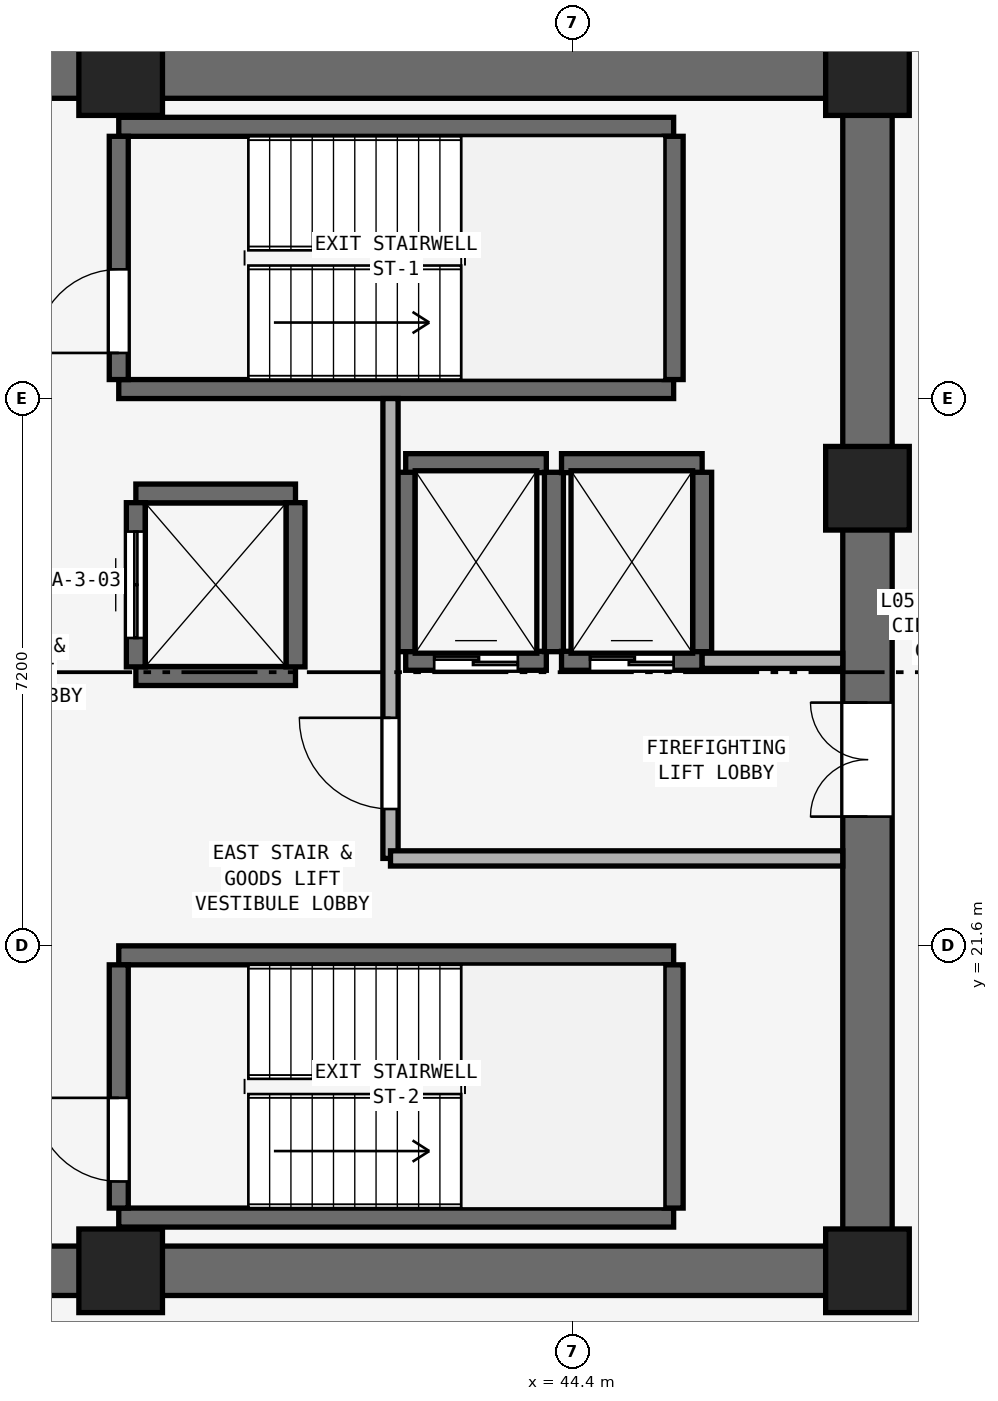
"""IFC4 building model, lengths in metres.
Left out: names, types, materials, properties, quantities, classifications, styles, units other than length and angle.
Written with IfcOpenShell. Run it as: python <this file> out.ifc"""

import sys

from ifc_helpers import new_model, si_unit, direction, frame, frame_2d, origin, origin_2d, place, context, subcontext, project, spatial, rectangle, extrude, element, fill, save


model = new_model("IFC4")
c1 = context("Model", 3, precision=1e-05, world=origin(), true_north=direction((0.0, 1.0)))
c2 = subcontext(c1, "Body", "Model", "MODEL_VIEW")
j1 = project(units=[si_unit("LENGTHUNIT", "METRE"), si_unit("PLANEANGLEUNIT", "RADIAN")], contexts=[c1])
p1 = place(None, origin())
s1 = spatial("IfcSite", under=j1, at=p1, CompositionType="ELEMENT")
p2 = place(p1, origin())
s2 = spatial("IfcBuilding", under=s1, at=p2, CompositionType="ELEMENT")
p3 = place(p2, frame((0.0, 0.0, 25.0)))
s3 = spatial("IfcBuildingStorey", under=s2, at=p3, CompositionType="ELEMENT", Elevation=25.0)
for number, where, z_axis, x_axis in (
    (1, (25.4, 17.325, 0.0), (0.0, 0.0, 1.0), (1.0, 0.0, 0.0)),
    (2, (25.4, 33.075, 0.0), (0.0, 0.0, 1.0), (1.0, 0.0, 0.0)),
):
    element("IfcWall", number, at=place(p3, frame(where, z_axis=z_axis, x_axis=x_axis)), inside=s3, PredefinedType="SHEAR", context=c2, shape_type="SweptSolid", body=[
        extrude(rectangle(XDim=23.2, YDim=0.65, at=frame_2d((11.6, 0.0))), origin(), (0.0, 0.0, 1.0), 3.525),
    ])
p4 = place(p3, frame((48.275, 17.65, 0.0), z_axis=(0.0, 0.0, 1.0), x_axis=(0.0, 1.0, 0.0)))
e3 = element("IfcWall", 3, at=p4, inside=s3, PredefinedType="SHEAR", context=c2, shape_type="SweptSolid", body=[
    extrude(rectangle(XDim=15.1, YDim=0.65, at=frame_2d((7.55, 0.0))), origin(), (0.0, 0.0, 1.0), 3.525),
])
p5 = place(p4, frame((5.65, 0.0, 0.0)))
e4 = element("IfcOpeningElement", 4, at=p5, cuts=e3, PredefinedType="OPENING", context=c2, shape_type="SweptSolid", body=[
    extrude(rectangle(XDim=1.5, YDim=2.15, at=frame_2d((0.75, 1.075))), frame((0.0, 0.335, 0.0), z_axis=(0.0, -1.0, 0.0), x_axis=(1.0, 0.0, 0.0)), (0.0, 0.0, 1.0), 0.67),
])
for number, where, z_axis, x_axis in (
    (5, (38.45, 17.325, 0.0), (0.0, 0.0, 1.0), (1.0, 0.0, 0.0)),
    (6, (48.275, 17.325, 0.0), (0.0, 0.0, 1.0), (1.0, 0.0, 0.0)),
    (7, (48.275, 27.62, 0.0), (0.0, 0.0, 1.0), (1.0, 0.0, 0.0)),
    (8, (48.275, 33.075, 0.0), (0.0, 0.0, 1.0), (1.0, 0.0, 0.0)),
    (9, (38.45, 33.075, 0.0), (0.0, 0.0, 1.0), (1.0, 0.0, 0.0)),
):
    element("IfcColumn", number, at=place(p3, frame(where, z_axis=z_axis, x_axis=x_axis)), inside=s3, PredefinedType="PILASTER", context=c2, shape_type="SweptSolid", body=[
        extrude(rectangle(XDim=1.1, YDim=1.1, at=origin_2d()), origin(), (0.0, 0.0, 1.0), 3.8),
    ])
for number, where, z_axis, x_axis in (
    (10, (38.425, 28.925, 0.0), (0.0, 0.0, 1.0), (1.0, 0.0, 0.0)),
    (11, (38.425, 32.375, 0.0), (0.0, 0.0, 1.0), (1.0, 0.0, 0.0)),
):
    element("IfcWall", number, at=place(p3, frame(where, z_axis=z_axis, x_axis=x_axis)), inside=s3, PredefinedType="SHEAR", context=c2, shape_type="SweptSolid", body=[
        extrude(rectangle(XDim=7.3, YDim=0.25, at=frame_2d((3.65, 0.0))), origin(), (0.0, 0.0, 1.0), 3.525),
    ])
p6 = place(p3, frame((38.425, 29.05, 0.0), z_axis=(0.0, 0.0, 1.0), x_axis=(0.0, 1.0, 0.0)))
e12 = element("IfcWall", 12, at=p6, inside=s3, PredefinedType="SHEAR", context=c2, shape_type="SweptSolid", body=[
    extrude(rectangle(XDim=3.2, YDim=0.25, at=frame_2d((1.6, 0.0))), origin(), (0.0, 0.0, 1.0), 3.525),
])
p7 = place(p6, frame((0.35, 0.0, 0.0)))
e13 = element("IfcOpeningElement", 13, at=p7, cuts=e12, PredefinedType="OPENING", context=c2, shape_type="SweptSolid", body=[
    extrude(rectangle(XDim=1.1, YDim=2.15, at=frame_2d((0.55, 1.075))), frame((0.0, 0.135, 0.0), z_axis=(0.0, -1.0, 0.0), x_axis=(1.0, 0.0, 0.0)), (0.0, 0.0, 1.0), 0.27),
])
p8 = place(p3, frame((45.725, 29.05, 0.0), z_axis=(0.0, 0.0, 1.0), x_axis=(0.0, 1.0, 0.0)))
e14 = element("IfcWall", 14, at=p8, inside=s3, PredefinedType="SHEAR", context=c2, shape_type="SweptSolid", body=[
    extrude(rectangle(XDim=3.2, YDim=0.25, at=frame_2d((1.6, 0.0))), origin(), (0.0, 0.0, 1.0), 3.525),
])
for number, where, z_axis, x_axis in (
    (15, (38.425, 18.025, 0.0), (0.0, 0.0, 1.0), (1.0, 0.0, 0.0)),
    (16, (38.425, 21.475, 0.0), (0.0, 0.0, 1.0), (1.0, 0.0, 0.0)),
):
    element("IfcWall", number, at=place(p3, frame(where, z_axis=z_axis, x_axis=x_axis)), inside=s3, PredefinedType="SHEAR", context=c2, shape_type="SweptSolid", body=[
        extrude(rectangle(XDim=7.3, YDim=0.25, at=frame_2d((3.65, 0.0))), origin(), (0.0, 0.0, 1.0), 3.525),
    ])
p9 = place(p3, frame((38.425, 18.15, 0.0), z_axis=(0.0, 0.0, 1.0), x_axis=(0.0, 1.0, 0.0)))
e17 = element("IfcWall", 17, at=p9, inside=s3, PredefinedType="SHEAR", context=c2, shape_type="SweptSolid", body=[
    extrude(rectangle(XDim=3.2, YDim=0.25, at=frame_2d((1.6, 0.0))), origin(), (0.0, 0.0, 1.0), 3.525),
])
p10 = place(p9, frame((0.35, 0.0, 0.0)))
e18 = element("IfcOpeningElement", 18, at=p10, cuts=e17, PredefinedType="OPENING", context=c2, shape_type="SweptSolid", body=[
    extrude(rectangle(XDim=1.1, YDim=2.15, at=frame_2d((0.55, 1.075))), frame((0.0, 0.135, 0.0), z_axis=(0.0, -1.0, 0.0), x_axis=(1.0, 0.0, 0.0)), (0.0, 0.0, 1.0), 0.27),
])
p11 = place(p3, frame((45.725, 18.15, 0.0), z_axis=(0.0, 0.0, 1.0), x_axis=(0.0, 1.0, 0.0)))
e19 = element("IfcWall", 19, at=p11, inside=s3, PredefinedType="SHEAR", context=c2, shape_type="SweptSolid", body=[
    extrude(rectangle(XDim=3.2, YDim=0.25, at=frame_2d((1.6, 0.0))), origin(), (0.0, 0.0, 1.0), 3.525),
])
p12 = place(p3, frame((42.2, 25.35, 0.0), z_axis=(0.0, 0.0, 1.0), x_axis=(1.0, 0.0, 0.0)))
e20 = element("IfcWall", 20, at=p12, inside=s3, PredefinedType="SHEAR", context=c2, shape_type="SweptSolid", body=[
    extrude(rectangle(XDim=1.85, YDim=0.25, at=frame_2d((0.925, 0.0))), origin(), (0.0, 0.0, 1.0), 3.525),
])
p13 = place(p12, frame((0.375, 0.0, 0.0)))
e21 = element("IfcOpeningElement", 21, at=p13, cuts=e20, PredefinedType="OPENING", context=c2, shape_type="SweptSolid", body=[
    extrude(rectangle(XDim=1.1, YDim=2.15, at=frame_2d((0.55, 1.075))), frame((0.0, 0.135, 0.0), z_axis=(0.0, -1.0, 0.0), x_axis=(1.0, 0.0, 0.0)), (0.0, 0.0, 1.0), 0.27),
])
p14 = place(p3, frame((42.2, 27.95, 0.0), z_axis=(0.0, 0.0, 1.0), x_axis=(1.0, 0.0, 0.0)))
e22 = element("IfcWall", 22, at=p14, inside=s3, PredefinedType="SHEAR", context=c2, shape_type="SweptSolid", body=[
    extrude(rectangle(XDim=1.85, YDim=0.25, at=frame_2d((0.925, 0.0))), origin(), (0.0, 0.0, 1.0), 3.525),
])
for number, where, z_axis, x_axis in (
    (23, (42.2, 25.47, 0.0), (0.0, 0.0, 1.0), (0.0, 1.0, 0.0)),
    (24, (44.15, 25.47, 0.0), (0.0, 0.0, 1.0), (0.0, 1.0, 0.0)),
):
    element("IfcWall", number, at=place(p3, frame(where, z_axis=z_axis, x_axis=x_axis)), inside=s3, PredefinedType="SHEAR", context=c2, shape_type="SweptSolid", body=[
        extrude(rectangle(XDim=2.36, YDim=0.25, at=frame_2d((1.18, 0.0))), origin(), (0.0, 0.0, 1.0), 3.525),
    ])
p15 = place(p3, frame((44.25, 25.35, 0.0), z_axis=(0.0, 0.0, 1.0), x_axis=(1.0, 0.0, 0.0)))
e25 = element("IfcWall", 25, at=p15, inside=s3, PredefinedType="SHEAR", context=c2, shape_type="SweptSolid", body=[
    extrude(rectangle(XDim=1.85, YDim=0.25, at=frame_2d((0.925, 0.0))), origin(), (0.0, 0.0, 1.0), 3.525),
])
p16 = place(p15, frame((0.375, 0.0, 0.0)))
e26 = element("IfcOpeningElement", 26, at=p16, cuts=e25, PredefinedType="OPENING", context=c2, shape_type="SweptSolid", body=[
    extrude(rectangle(XDim=1.1, YDim=2.15, at=frame_2d((0.55, 1.075))), frame((0.0, 0.135, 0.0), z_axis=(0.0, -1.0, 0.0), x_axis=(1.0, 0.0, 0.0)), (0.0, 0.0, 1.0), 0.27),
])
p17 = place(p3, frame((44.25, 27.95, 0.0), z_axis=(0.0, 0.0, 1.0), x_axis=(1.0, 0.0, 0.0)))
e27 = element("IfcWall", 27, at=p17, inside=s3, PredefinedType="SHEAR", context=c2, shape_type="SweptSolid", body=[
    extrude(rectangle(XDim=1.85, YDim=0.25, at=frame_2d((0.925, 0.0))), origin(), (0.0, 0.0, 1.0), 3.525),
])
p18 = place(p3, frame((46.1, 25.47, 0.0), z_axis=(0.0, 0.0, 1.0), x_axis=(0.0, 1.0, 0.0)))
e28 = element("IfcWall", 28, at=p18, inside=s3, PredefinedType="SHEAR", context=c2, shape_type="SweptSolid", body=[
    extrude(rectangle(XDim=2.36, YDim=0.25, at=frame_2d((1.18, 0.0))), origin(), (0.0, 0.0, 1.0), 3.525),
])
for number, where, z_axis, x_axis in (
    (29, (38.65, 25.15, 0.0), (0.0, 0.0, 1.0), (1.0, 0.0, 0.0)),
    (30, (38.65, 27.55, 0.0), (0.0, 0.0, 1.0), (1.0, 0.0, 0.0)),
):
    element("IfcWall", number, at=place(p3, frame(where, z_axis=z_axis, x_axis=x_axis)), inside=s3, PredefinedType="SHEAR", context=c2, shape_type="SweptSolid", body=[
        extrude(rectangle(XDim=2.1, YDim=0.25, at=frame_2d((1.05, 0.0))), origin(), (0.0, 0.0, 1.0), 3.525),
    ])
p19 = place(p3, frame((38.65, 25.27, 0.0), z_axis=(0.0, 0.0, 1.0), x_axis=(0.0, 1.0, 0.0)))
e31 = element("IfcWall", 31, at=p19, inside=s3, PredefinedType="SHEAR", context=c2, shape_type="SweptSolid", body=[
    extrude(rectangle(XDim=2.16, YDim=0.25, at=frame_2d((1.08, 0.0))), origin(), (0.0, 0.0, 1.0), 3.525),
])
p20 = place(p19, frame((0.38, 0.0, 0.0)))
e32 = element("IfcOpeningElement", 32, at=p20, cuts=e31, PredefinedType="OPENING", context=c2, shape_type="SweptSolid", body=[
    extrude(rectangle(XDim=1.4, YDim=2.2, at=frame_2d((0.7, 1.1))), frame((0.0, 0.135, 0.0), z_axis=(0.0, -1.0, 0.0), x_axis=(1.0, 0.0, 0.0)), (0.0, 0.0, 1.0), 0.27),
])
p21 = place(p3, frame((40.75, 25.27, 0.0), z_axis=(0.0, 0.0, 1.0), x_axis=(0.0, 1.0, 0.0)))
e33 = element("IfcWall", 33, at=p21, inside=s3, PredefinedType="SHEAR", context=c2, shape_type="SweptSolid", body=[
    extrude(rectangle(XDim=2.16, YDim=0.25, at=frame_2d((1.08, 0.0))), origin(), (0.0, 0.0, 1.0), 3.525),
])
p22 = place(p3, frame((42.0, 22.75, 0.0), z_axis=(0.0, 0.0, 1.0), x_axis=(0.0, 1.0, 0.0)))
e34 = element("IfcWall", 34, at=p22, inside=s3, PredefinedType="SOLIDWALL", context=c2, shape_type="SweptSolid", body=[
    extrude(rectangle(XDim=6.05, YDim=0.2, at=frame_2d((3.025, 0.0))), origin(), (0.0, 0.0, 1.0), 3.525),
])
p23 = place(p22, frame((0.65, 0.0, 0.0)))
e35 = element("IfcOpeningElement", 35, at=p23, cuts=e34, PredefinedType="OPENING", context=c2, shape_type="SweptSolid", body=[
    extrude(rectangle(XDim=1.2, YDim=2.15, at=frame_2d((0.6, 1.075))), frame((0.0, 0.11, 0.0), z_axis=(0.0, -1.0, 0.0), x_axis=(1.0, 0.0, 0.0)), (0.0, 0.0, 1.0), 0.22),
])
p24 = place(p3, frame((42.0, 22.75, 0.0), z_axis=(0.0, 0.0, 1.0), x_axis=(1.0, 0.0, 0.0)))
e36 = element("IfcWall", 36, at=p24, inside=s3, PredefinedType="SOLIDWALL", context=c2, shape_type="SweptSolid", body=[
    extrude(rectangle(XDim=5.95, YDim=0.2, at=frame_2d((2.975, 0.0))), origin(), (0.0, 0.0, 1.0), 3.525),
])
p25 = place(p3, frame((46.1, 25.35, 0.0), z_axis=(0.0, 0.0, 1.0), x_axis=(1.0, 0.0, 0.0)))
e37 = element("IfcWall", 37, at=p25, inside=s3, PredefinedType="SOLIDWALL", context=c2, shape_type="SweptSolid", body=[
    extrude(rectangle(XDim=1.85, YDim=0.2, at=frame_2d((0.925, 0.0))), origin(), (0.0, 0.0, 1.0), 3.525),
])
p26 = place(p7, origin())
e38 = element("IfcDoor", 38, at=p26, inside=s3, OperationType="SINGLE_SWING_LEFT", PredefinedType="DOOR", context=c2, shape_type="SweptSolid", body=[
    extrude(rectangle(XDim=1.1, YDim=2.15, at=frame_2d((0.55, 1.075))), frame((0.0, 0.025, 0.0), z_axis=(0.0, -1.0, 0.0), x_axis=(1.0, 0.0, 0.0)), (0.0, 0.0, 1.0), 0.05),
])
fill(e13, e38)
p27 = place(p10, origin())
e39 = element("IfcDoor", 39, at=p27, inside=s3, OperationType="SINGLE_SWING_RIGHT", PredefinedType="DOOR", context=c2, shape_type="SweptSolid", body=[
    extrude(rectangle(XDim=1.1, YDim=2.15, at=frame_2d((0.55, 1.075))), frame((0.0, 0.025, 0.0), z_axis=(0.0, -1.0, 0.0), x_axis=(1.0, 0.0, 0.0)), (0.0, 0.0, 1.0), 0.05),
])
fill(e18, e39)
p28 = place(p13, origin())
e40 = element("IfcDoor", 40, at=p28, inside=s3, OperationType="DOUBLE_DOOR_SLIDING", PredefinedType="DOOR", context=c2, shape_type="SweptSolid", body=[
    extrude(rectangle(XDim=1.1, YDim=2.15, at=frame_2d((0.55, 1.075))), frame((0.0, 0.025, 0.0), z_axis=(0.0, -1.0, 0.0), x_axis=(1.0, 0.0, 0.0)), (0.0, 0.0, 1.0), 0.05),
])
fill(e21, e40)
p29 = place(p16, origin())
e41 = element("IfcDoor", 41, at=p29, inside=s3, OperationType="DOUBLE_DOOR_SLIDING", PredefinedType="DOOR", context=c2, shape_type="SweptSolid", body=[
    extrude(rectangle(XDim=1.1, YDim=2.15, at=frame_2d((0.55, 1.075))), frame((0.0, 0.025, 0.0), z_axis=(0.0, -1.0, 0.0), x_axis=(1.0, 0.0, 0.0)), (0.0, 0.0, 1.0), 0.05),
])
fill(e26, e41)
p30 = place(p20, origin())
e42 = element("IfcDoor", 42, at=p30, inside=s3, OperationType="DOUBLE_DOOR_SLIDING", PredefinedType="DOOR", context=c2, shape_type="SweptSolid", body=[
    extrude(rectangle(XDim=1.4, YDim=2.2, at=frame_2d((0.7, 1.1))), frame((0.0, 0.025, 0.0), z_axis=(0.0, -1.0, 0.0), x_axis=(1.0, 0.0, 0.0)), (0.0, 0.0, 1.0), 0.05),
])
fill(e32, e42)
p31 = place(p23, origin())
e43 = element("IfcDoor", 43, at=p31, inside=s3, OperationType="SINGLE_SWING_RIGHT", PredefinedType="DOOR", context=c2, shape_type="SweptSolid", body=[
    extrude(rectangle(XDim=1.2, YDim=2.15, at=frame_2d((0.6, 1.075))), frame((0.0, 0.025, 0.0), z_axis=(0.0, -1.0, 0.0), x_axis=(1.0, 0.0, 0.0)), (0.0, 0.0, 1.0), 0.05),
])
fill(e35, e43)
p32 = place(p5, origin())
e44 = element("IfcDoor", 44, at=p32, inside=s3, OperationType="DOUBLE_DOOR_SINGLE_SWING", PredefinedType="DOOR", context=c2, shape_type="SweptSolid", body=[
    extrude(rectangle(XDim=1.5, YDim=2.15, at=frame_2d((0.75, 1.075))), frame((0.0, 0.025, 0.0), z_axis=(0.0, -1.0, 0.0), x_axis=(1.0, 0.0, 0.0)), (0.0, 0.0, 1.0), 0.05),
])
fill(e4, e44)
save(model, sys.argv[1])
